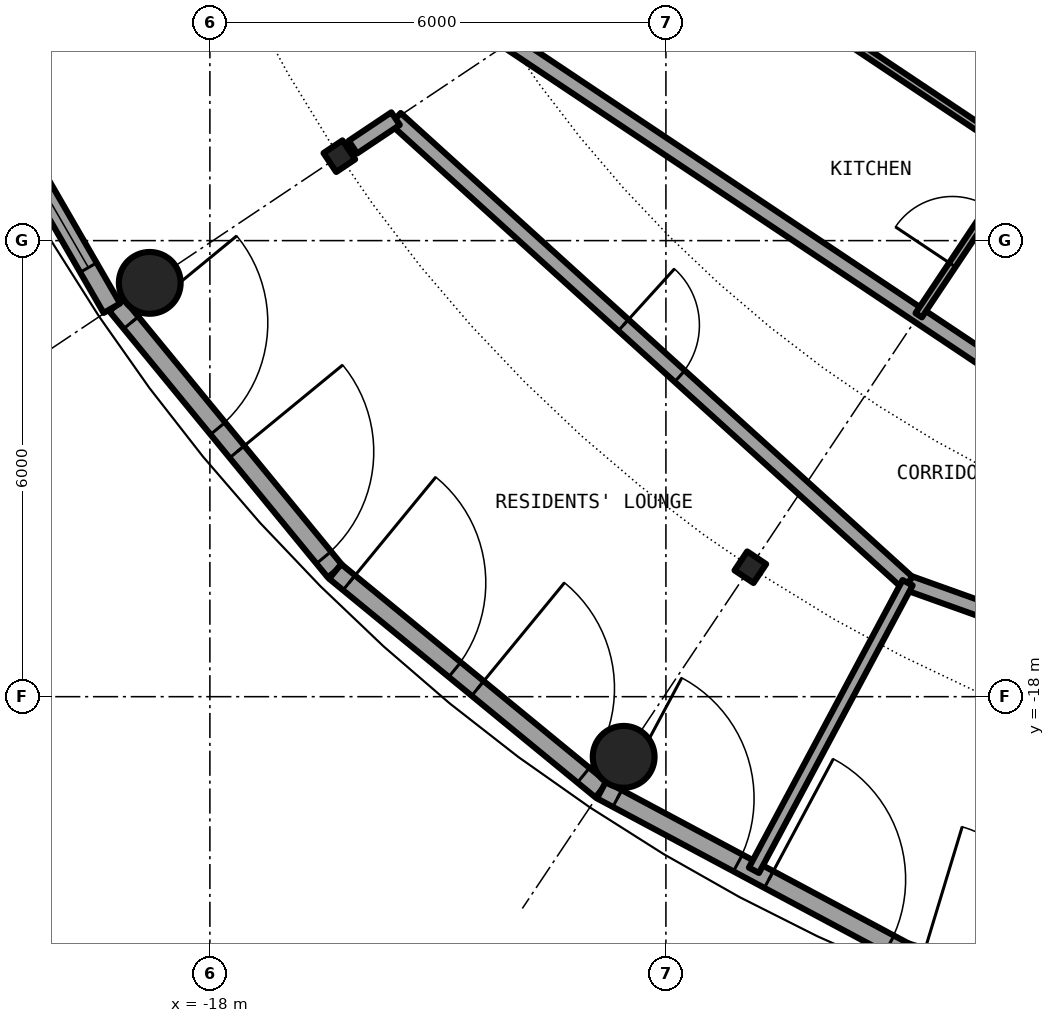
"""IFC4 building model, lengths in metres.
Left out: names, types, materials, properties, quantities, classifications, styles, units other than length and angle.
Written with IfcOpenShell. Run it as: python <this file> out.ifc"""

import sys

from ifc_helpers import new_model, si_unit, direction, frame, frame_2d, origin, origin_2d, place, context, subcontext, project, spatial, rectangle, hollow_circle, i_section, extrude, element, fill, save


model = new_model("IFC4")
c1 = context("Model", 3, precision=1e-05, world=origin(), true_north=direction((0.0, 1.0)))
c2 = subcontext(c1, "Body", "Model", "MODEL_VIEW")
j1 = project(units=[si_unit("LENGTHUNIT", "METRE"), si_unit("PLANEANGLEUNIT", "RADIAN")], contexts=[c1])
p1 = place(None, origin())
s1 = spatial("IfcSite", under=j1, at=p1, CompositionType="ELEMENT")
p2 = place(p1, origin())
s2 = spatial("IfcBuilding", under=s1, at=p2, CompositionType="ELEMENT")
p3 = place(p2, frame((0.0, 0.0, 249.3)))
s3 = spatial("IfcBuildingStorey", under=s2, at=p3, CompositionType="ELEMENT", Elevation=249.3)
for number, where, z_axis, x_axis in (
    (1, (-18.791, -12.556, 0.0), (0.0, 0.0, 1.0), (1.0, 0.0, 0.0)),
    (2, (-12.556, -18.791, 0.0), (0.0, 0.0, 1.0), (1.0, 0.0, 0.0)),
):
    element("IfcColumn", number, at=place(p3, frame(where, z_axis=z_axis, x_axis=x_axis)), inside=s3, PredefinedType="COLUMN", context=c2, shape_type="SweptSolid", body=[
        extrude(hollow_circle(Radius=0.406, WallThickness=0.03, at=origin_2d()), origin(), (0.0, 0.0, 1.0), 3.05),
    ])
for number, where, z_axis, x_axis in (
    (3, (-16.297, -10.889, 0.0), (0.0, 0.0, 1.0), (-0.831, -0.556, 0.0)),
    (4, (-10.889, -16.297, 0.0), (0.0, 0.0, 1.0), (-0.556, -0.831, 0.0)),
):
    element("IfcColumn", number, at=place(p3, frame(where, z_axis=z_axis, x_axis=x_axis)), inside=s3, PredefinedType="COLUMN", context=c2, shape_type="SweptSolid", body=[
        extrude(i_section(OverallWidth=0.3, OverallDepth=0.3, WebThickness=0.011, FlangeThickness=0.019, FilletRadius=0.027, at=origin_2d()), origin(), (0.0, 0.0, 1.0), 3.05),
    ])
p4 = place(p3, frame((-19.228, -12.848, 0.0), z_axis=(0.0, 0.0, 1.0), x_axis=(0.634418942337, -0.772989395532, 0.0)))
e5 = element("IfcWall", 5, at=p4, inside=s3, PredefinedType="SOLIDWALL", context=c2, shape_type="SweptSolid", body=[
    extrude(rectangle(XDim=4.533, YDim=0.25, at=frame_2d((2.267, 0.0))), origin(), (0.0, 0.0, 1.0), 2.7),
])
p5 = place(p4, frame((0.3, 0.0, 0.0)))
e6 = element("IfcOpeningElement", 6, at=p5, cuts=e5, PredefinedType="OPENING", context=c2, shape_type="SweptSolid", body=[
    extrude(rectangle(XDim=1.8, YDim=2.2, at=frame_2d((0.9, 1.1))), frame((0.0, 0.135, 0.0), z_axis=(0.0, -1.0, 0.0), x_axis=(1.0, 0.0, 0.0)), (0.0, 0.0, 1.0), 0.27),
])
p6 = place(p4, frame((2.497, 0.0, 0.0)))
e7 = element("IfcOpeningElement", 7, at=p6, cuts=e5, PredefinedType="OPENING", context=c2, shape_type="SweptSolid", body=[
    extrude(rectangle(XDim=1.8, YDim=2.2, at=frame_2d((0.9, 1.1))), frame((0.0, 0.135, 0.0), z_axis=(0.0, -1.0, 0.0), x_axis=(1.0, 0.0, 0.0)), (0.0, 0.0, 1.0), 0.27),
])
p7 = place(p3, frame((-16.352, -16.352, 0.0), z_axis=(0.0, 0.0, 1.0), x_axis=(0.772989395532, -0.634418942337, 0.0)))
e8 = element("IfcWall", 8, at=p7, inside=s3, PredefinedType="SOLIDWALL", context=c2, shape_type="SweptSolid", body=[
    extrude(rectangle(XDim=4.533, YDim=0.25, at=frame_2d((2.267, 0.0))), origin(), (0.0, 0.0, 1.0), 2.7),
])
p8 = place(p7, frame((0.236, 0.0, 0.0)))
e9 = element("IfcOpeningElement", 9, at=p8, cuts=e8, PredefinedType="OPENING", context=c2, shape_type="SweptSolid", body=[
    extrude(rectangle(XDim=1.8, YDim=2.2, at=frame_2d((0.9, 1.1))), frame((0.0, 0.135, 0.0), z_axis=(0.0, -1.0, 0.0), x_axis=(1.0, 0.0, 0.0)), (0.0, 0.0, 1.0), 0.27),
])
p9 = place(p7, frame((2.427, 0.0, 0.0)))
e10 = element("IfcOpeningElement", 10, at=p9, cuts=e8, PredefinedType="OPENING", context=c2, shape_type="SweptSolid", body=[
    extrude(rectangle(XDim=1.8, YDim=2.2, at=frame_2d((0.9, 1.1))), frame((0.0, 0.135, 0.0), z_axis=(0.0, -1.0, 0.0), x_axis=(1.0, 0.0, 0.0)), (0.0, 0.0, 1.0), 0.27),
])
p10 = place(p3, frame((-12.848, -19.228, 0.0), z_axis=(0.0, 0.0, 1.0), x_axis=(0.881912752543, -0.471412660947, 0.0)))
e11 = element("IfcWall", 11, at=p10, inside=s3, PredefinedType="SOLIDWALL", context=c2, shape_type="SweptSolid", body=[
    extrude(rectangle(XDim=4.533, YDim=0.25, at=frame_2d((2.267, 0.0))), origin(), (0.0, 0.0, 1.0), 2.7),
])
p11 = place(p10, frame((0.236, 0.0, 0.0)))
e12 = element("IfcOpeningElement", 12, at=p11, cuts=e11, PredefinedType="OPENING", context=c2, shape_type="SweptSolid", body=[
    extrude(rectangle(XDim=1.8, YDim=2.2, at=frame_2d((0.9, 1.1))), frame((0.0, 0.135, 0.0), z_axis=(0.0, -1.0, 0.0), x_axis=(1.0, 0.0, 0.0)), (0.0, 0.0, 1.0), 0.27),
])
p12 = place(p10, frame((2.497, 0.0, 0.0)))
e13 = element("IfcOpeningElement", 13, at=p12, cuts=e11, PredefinedType="OPENING", context=c2, shape_type="SweptSolid", body=[
    extrude(rectangle(XDim=1.8, YDim=2.2, at=frame_2d((0.9, 1.1))), frame((0.0, 0.135, 0.0), z_axis=(0.0, -1.0, 0.0), x_axis=(1.0, 0.0, 0.0)), (0.0, 0.0, 1.0), 0.27),
])
p13 = place(p3, frame((-20.807, -10.261, 0.0), z_axis=(0.0, 0.0, 1.0), x_axis=(0.499903546559, -0.866081084043, 0.0)))
e14 = element("IfcWall", 14, at=p13, inside=s3, PredefinedType="SOLIDWALL", context=c2, shape_type="SweptSolid", body=[
    extrude(rectangle(XDim=3.034, YDim=0.25, at=frame_2d((1.517, 0.0))), origin(), (0.0, 0.0, 1.0), 2.7),
])
p14 = place(p13, frame((0.617, 0.0, 0.3)))
e15 = element("IfcOpeningElement", 15, at=p14, cuts=e14, PredefinedType="OPENING", context=c2, shape_type="SweptSolid", body=[
    extrude(rectangle(XDim=1.8, YDim=2.1, at=frame_2d((0.9, 1.05))), frame((0.0, 0.135, 0.0), z_axis=(0.0, -1.0, 0.0), x_axis=(1.0, 0.0, 0.0)), (0.0, 0.0, 1.0), 0.27),
])
p15 = place(p3, frame((-8.82, -16.501, 0.0), z_axis=(0.0, 0.0, 1.0), x_axis=(0.941533512578, -0.336919344492, 0.0)))
e16 = element("IfcWall", 16, at=p15, inside=s3, PredefinedType="PARTITIONING", context=c2, shape_type="SweptSolid", body=[
    extrude(rectangle(XDim=5.491, YDim=0.2, at=frame_2d((2.746, 0.0))), origin(), (0.0, 0.0, 1.0), 2.7),
])
p16 = place(p15, frame((2.246, 0.0, 0.0)))
e17 = element("IfcOpeningElement", 17, at=p16, cuts=e16, PredefinedType="OPENING", context=c2, shape_type="SweptSolid", body=[
    extrude(rectangle(XDim=1.0, YDim=2.3, at=frame_2d((0.5, 1.15))), frame((0.0, 0.11, 0.0), z_axis=(0.0, -1.0, 0.0), x_axis=(1.0, 0.0, 0.0)), (0.0, 0.0, 1.0), 0.22),
])
p17 = place(p3, frame((-15.557, -10.395, 0.0), z_axis=(0.0, 0.0, 1.0), x_axis=(0.740947701955, -0.671562731967, 0.0)))
e18 = element("IfcWall", 18, at=p17, inside=s3, PredefinedType="PARTITIONING", context=c2, shape_type="SweptSolid", body=[
    extrude(rectangle(XDim=9.092, YDim=0.2, at=frame_2d((4.546, 0.0))), origin(), (0.0, 0.0, 1.0), 2.7),
])
p18 = place(p17, frame((4.046, 0.0, 0.0)))
e19 = element("IfcOpeningElement", 19, at=p18, cuts=e18, PredefinedType="OPENING", context=c2, shape_type="SweptSolid", body=[
    extrude(rectangle(XDim=1.0, YDim=2.3, at=frame_2d((0.5, 1.15))), frame((0.0, 0.11, 0.0), z_axis=(0.0, -1.0, 0.0), x_axis=(1.0, 0.0, 0.0)), (0.0, 0.0, 1.0), 0.22),
])
p19 = place(p3, frame((-14.052, -9.392, 0.0), z_axis=(0.0, 0.0, 1.0), x_axis=(0.831588235223, -0.555392660231, 0.0)))
e20 = element("IfcWall", 20, at=p19, inside=s3, PredefinedType="PARTITIONING", context=c2, shape_type="SweptSolid", body=[
    extrude(rectangle(XDim=12.933, YDim=0.2, at=frame_2d((6.466, 0.0))), origin(), (0.0, 0.0, 1.0), 2.7),
])
p20 = place(p19, frame((7.585, 0.0, 0.0)))
e21 = element("IfcOpeningElement", 21, at=p20, cuts=e20, PredefinedType="OPENING", context=c2, shape_type="SweptSolid", body=[
    extrude(rectangle(XDim=1.0, YDim=2.3, at=frame_2d((0.5, 1.15))), frame((0.0, 0.11, 0.0), z_axis=(0.0, -1.0, 0.0), x_axis=(1.0, 0.0, 0.0)), (0.0, 0.0, 1.0), 0.22),
])
p21 = place(p3, frame((-10.143, -9.002, 0.0), z_axis=(0.0, 0.0, 1.0), x_axis=(0.831595529181, -0.555381738849, 0.0)))
e22 = element("IfcWall", 22, at=p21, inside=s3, PredefinedType="PARTITIONING", context=c2, shape_type="SweptSolid", body=[
    extrude(rectangle(XDim=4.793, YDim=0.1, at=frame_2d((2.396, 0.0))), origin(), (0.0, 0.0, 1.0), 2.7),
])
p22 = place(p3, frame((-16.118, -10.77, 0.0), z_axis=(0.0, 0.0, 1.0), x_axis=(0.831381780519, 0.555701660086, 0.0)))
e23 = element("IfcWall", 23, at=p22, inside=s3, PredefinedType="PARTITIONING", context=c2, shape_type="SweptSolid", body=[
    extrude(rectangle(XDim=0.675, YDim=0.2, at=frame_2d((0.337, 0.0))), origin(), (0.0, 0.0, 1.0), 2.7),
])
p23 = place(p3, frame((-10.842, -20.284, 0.0), z_axis=(0.0, 0.0, 1.0), x_axis=(0.471385667229, 0.881927181082, 0.0)))
e24 = element("IfcWall", 24, at=p23, inside=s3, PredefinedType="PARTITIONING", context=c2, shape_type="SweptSolid", body=[
    extrude(rectangle(XDim=4.289, YDim=0.15, at=frame_2d((2.145, 0.0))), origin(), (0.0, 0.0, 1.0), 2.7),
])
p24 = place(p3, frame((-8.674, -12.982, 0.0), z_axis=(0.0, 0.0, 1.0), x_axis=(0.555355163998, 0.831613276602, 0.0)))
e25 = element("IfcWall", 25, at=p24, inside=s3, PredefinedType="PARTITIONING", context=c2, shape_type="SweptSolid", body=[
    extrude(rectangle(XDim=2.494, YDim=0.1, at=frame_2d((1.247, 0.0))), origin(), (0.0, 0.0, 1.0), 2.7),
])
p25 = place(p24, frame((0.797, 0.0, 0.0)))
e26 = element("IfcOpeningElement", 26, at=p25, cuts=e25, PredefinedType="OPENING", context=c2, shape_type="SweptSolid", body=[
    extrude(rectangle(XDim=0.9, YDim=2.3, at=frame_2d((0.45, 1.15))), frame((0.0, 0.06, 0.0), z_axis=(0.0, -1.0, 0.0), x_axis=(1.0, 0.0, 0.0)), (0.0, 0.0, 1.0), 0.12),
])
p26 = place(p5, origin())
e27 = element("IfcDoor", 27, at=p26, inside=s3, OperationType="SINGLE_SWING_LEFT", PredefinedType="DOOR", context=c2, shape_type="SweptSolid", body=[
    extrude(rectangle(XDim=1.8, YDim=2.2, at=frame_2d((0.9, 1.1))), frame((0.0, 0.025, 0.0), z_axis=(0.0, -1.0, 0.0), x_axis=(1.0, 0.0, 0.0)), (0.0, 0.0, 1.0), 0.05),
])
fill(e6, e27)
p27 = place(p6, origin())
e28 = element("IfcDoor", 28, at=p27, inside=s3, OperationType="SINGLE_SWING_LEFT", PredefinedType="DOOR", context=c2, shape_type="SweptSolid", body=[
    extrude(rectangle(XDim=1.8, YDim=2.2, at=frame_2d((0.9, 1.1))), frame((0.0, 0.025, 0.0), z_axis=(0.0, -1.0, 0.0), x_axis=(1.0, 0.0, 0.0)), (0.0, 0.0, 1.0), 0.05),
])
fill(e7, e28)
p28 = place(p8, origin())
e29 = element("IfcDoor", 29, at=p28, inside=s3, OperationType="SINGLE_SWING_LEFT", PredefinedType="DOOR", context=c2, shape_type="SweptSolid", body=[
    extrude(rectangle(XDim=1.8, YDim=2.2, at=frame_2d((0.9, 1.1))), frame((0.0, 0.025, 0.0), z_axis=(0.0, -1.0, 0.0), x_axis=(1.0, 0.0, 0.0)), (0.0, 0.0, 1.0), 0.05),
])
fill(e9, e29)
p29 = place(p9, origin())
e30 = element("IfcDoor", 30, at=p29, inside=s3, OperationType="SINGLE_SWING_LEFT", PredefinedType="DOOR", context=c2, shape_type="SweptSolid", body=[
    extrude(rectangle(XDim=1.8, YDim=2.2, at=frame_2d((0.9, 1.1))), frame((0.0, 0.025, 0.0), z_axis=(0.0, -1.0, 0.0), x_axis=(1.0, 0.0, 0.0)), (0.0, 0.0, 1.0), 0.05),
])
fill(e10, e30)
p30 = place(p11, origin())
e31 = element("IfcDoor", 31, at=p30, inside=s3, OperationType="SINGLE_SWING_LEFT", PredefinedType="DOOR", context=c2, shape_type="SweptSolid", body=[
    extrude(rectangle(XDim=1.8, YDim=2.2, at=frame_2d((0.9, 1.1))), frame((0.0, 0.025, 0.0), z_axis=(0.0, -1.0, 0.0), x_axis=(1.0, 0.0, 0.0)), (0.0, 0.0, 1.0), 0.05),
])
fill(e12, e31)
p31 = place(p12, origin())
e32 = element("IfcDoor", 32, at=p31, inside=s3, OperationType="SINGLE_SWING_LEFT", PredefinedType="DOOR", context=c2, shape_type="SweptSolid", body=[
    extrude(rectangle(XDim=1.8, YDim=2.2, at=frame_2d((0.9, 1.1))), frame((0.0, 0.025, 0.0), z_axis=(0.0, -1.0, 0.0), x_axis=(1.0, 0.0, 0.0)), (0.0, 0.0, 1.0), 0.05),
])
fill(e13, e32)
p32 = place(p14, origin())
e33 = element("IfcWindow", 33, at=p32, inside=s3, PartitioningType="SINGLE_PANEL", PredefinedType="WINDOW", context=c2, shape_type="SweptSolid", body=[
    extrude(rectangle(XDim=1.8, YDim=2.1, at=frame_2d((0.9, 1.05))), frame((0.0, 0.03, 0.0), z_axis=(0.0, -1.0, 0.0), x_axis=(1.0, 0.0, 0.0)), (0.0, 0.0, 1.0), 0.06),
])
fill(e15, e33)
p33 = place(p18, origin())
e34 = element("IfcDoor", 34, at=p33, inside=s3, OperationType="SINGLE_SWING_RIGHT", PredefinedType="DOOR", context=c2, shape_type="SweptSolid", body=[
    extrude(rectangle(XDim=1.0, YDim=2.3, at=frame_2d((0.5, 1.15))), frame((0.0, 0.025, 0.0), z_axis=(0.0, -1.0, 0.0), x_axis=(1.0, 0.0, 0.0)), (0.0, 0.0, 1.0), 0.05),
])
fill(e19, e34)
p34 = place(p25, origin())
e35 = element("IfcDoor", 35, at=p34, inside=s3, OperationType="SINGLE_SWING_RIGHT", PredefinedType="DOOR", context=c2, shape_type="SweptSolid", body=[
    extrude(rectangle(XDim=0.9, YDim=2.3, at=frame_2d((0.45, 1.15))), frame((0.0, 0.025, 0.0), z_axis=(0.0, -1.0, 0.0), x_axis=(1.0, 0.0, 0.0)), (0.0, 0.0, 1.0), 0.05),
])
fill(e26, e35)
save(model, sys.argv[1])
